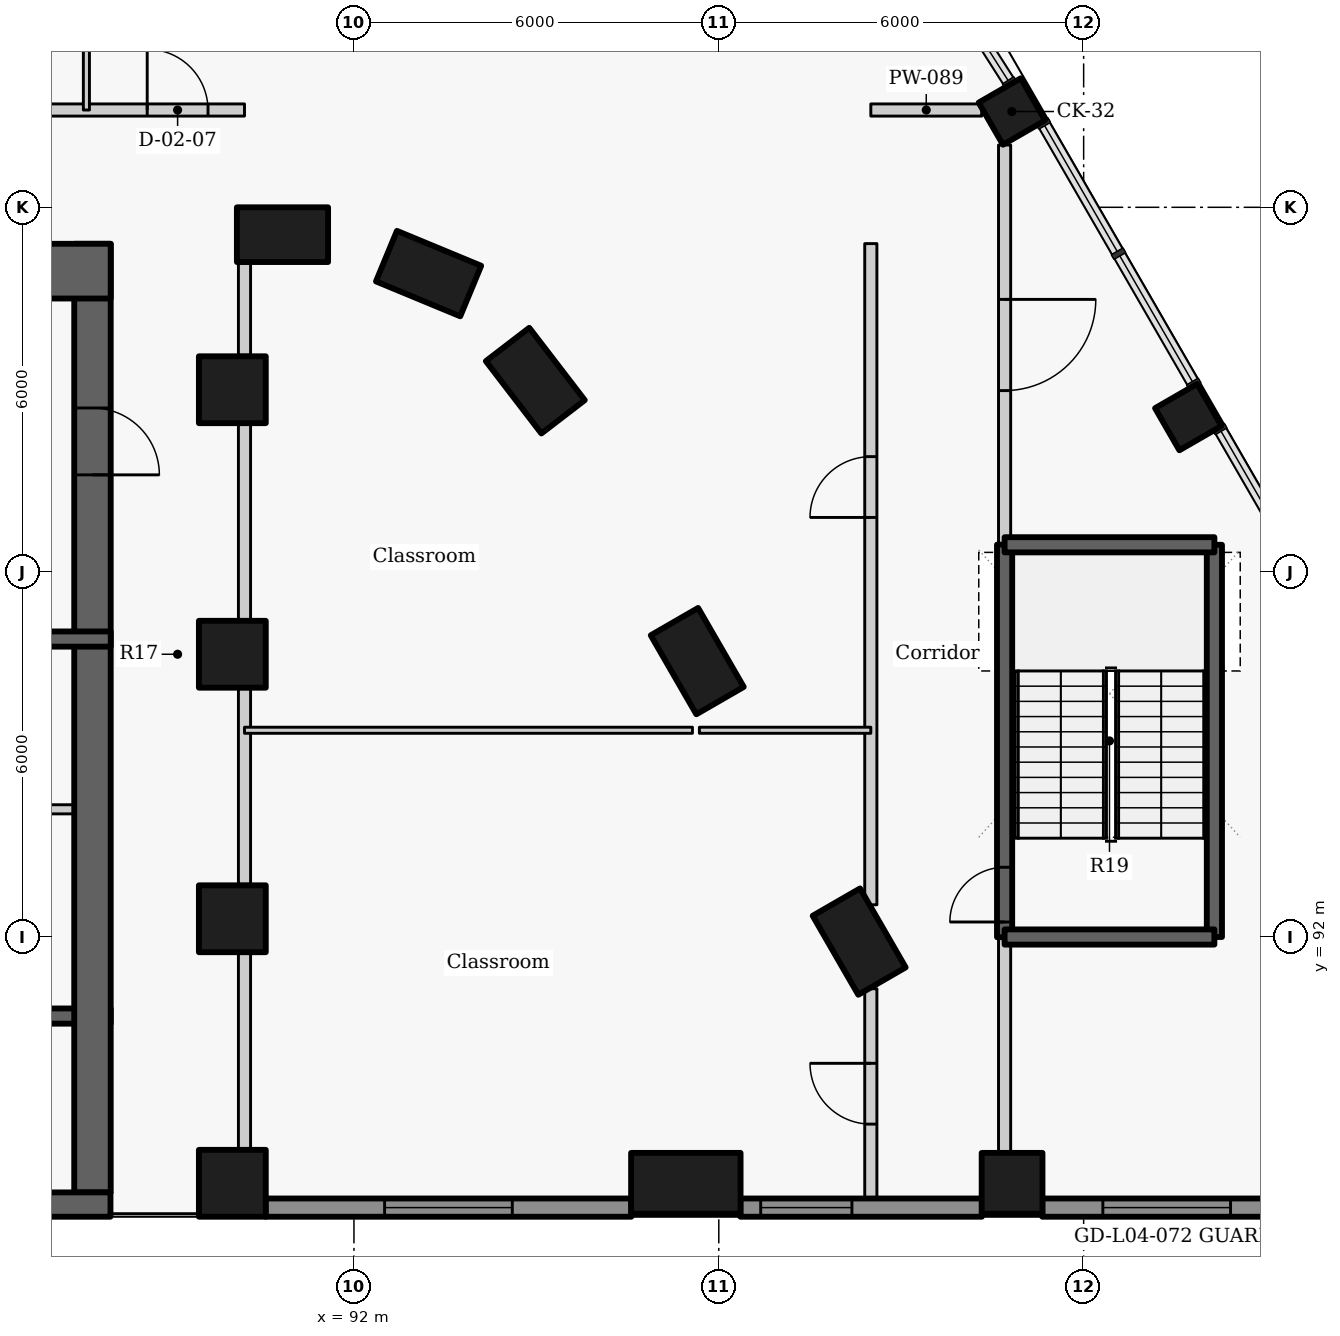
"""IFC4 building model, lengths in metres.
Left out: names, types, materials, properties, quantities, classifications, styles, units other than length and angle.
Written with IfcOpenShell. Run it as: python <this file> out.ifc"""

import sys

from ifc_helpers import new_model, si_unit, direction, frame, frame_2d, origin, origin_2d, place, context, subcontext, project, spatial, rectangle, extrude, element, fill, save


model = new_model("IFC4")
c1 = context("Model", 3, precision=1e-05, world=origin(), true_north=direction((0.0, 1.0)))
c2 = subcontext(c1, "Body", "Model", "MODEL_VIEW")
j1 = project(units=[si_unit("LENGTHUNIT", "METRE"), si_unit("PLANEANGLEUNIT", "RADIAN")], contexts=[c1])
p1 = place(None, origin())
s1 = spatial("IfcSite", under=j1, at=p1, CompositionType="ELEMENT")
p2 = place(p1, origin())
s2 = spatial("IfcBuilding", under=s1, at=p2, CompositionType="ELEMENT")
p3 = place(p2, frame((0.0, 0.0, 19.8)))
s3 = spatial("IfcBuildingStorey", under=s2, at=p3, CompositionType="ELEMENT", Elevation=19.8)
for number, where, z_axis, x_axis in (
    (1, (100.308, 91.925, 0.0), (0.0, 0.0, 1.0), (-0.5, 0.866, 0.0)),
    (2, (97.646, 96.537, 0.0), (0.0, 0.0, 1.0), (-0.5, 0.866, 0.0)),
    (3, (94.982, 101.149, 0.0), (0.0, 0.0, 1.0), (-0.609, 0.793, 0.0)),
    (4, (93.227, 102.91, 0.0), (0.0, 0.0, 1.0), (-0.924, 0.383, 0.0)),
    (5, (90.825, 103.55, 0.0), (0.0, 0.0, 1.0), (-1.0, 0.0, 0.0)),
):
    element("IfcColumn", number, at=place(p3, frame(where, z_axis=z_axis, x_axis=x_axis)), inside=s3, PredefinedType="COLUMN", context=c2, shape_type="SweptSolid", body=[
        extrude(rectangle(XDim=1.5, YDim=0.9, at=origin_2d()), origin(), (0.0, 0.0, 1.0), 4.2),
    ])
for number, where, z_axis, x_axis in (
    (6, (90.0, 87.95, 0.0), (0.0, 0.0, 1.0), (0.0, 1.0, 0.0)),
    (7, (90.0, 92.3, 0.0), (0.0, 0.0, 1.0), (0.0, 1.0, 0.0)),
    (8, (90.0, 96.65, 0.0), (0.0, 0.0, 1.0), (0.0, 1.0, 0.0)),
    (9, (90.0, 101.0, 0.0), (0.0, 0.0, 1.0), (0.0, 1.0, 0.0)),
):
    element("IfcColumn", number, at=place(p3, frame(where, z_axis=z_axis, x_axis=x_axis)), inside=s3, PredefinedType="COLUMN", context=c2, shape_type="SweptSolid", body=[
        extrude(rectangle(XDim=1.1, YDim=1.1, at=origin_2d()), origin(), (0.0, 0.0, 1.0), 4.2),
    ])
for number, where, z_axis, x_axis in (
    (10, (105.721, 100.55, 0.0), (0.0, 0.0, 1.0), (-0.5, 0.866, 0.0)),
    (11, (102.82, 105.575, 0.0), (0.0, 0.0, 1.0), (-0.5, 0.866, 0.0)),
):
    element("IfcColumn", number, at=place(p3, frame(where, z_axis=z_axis, x_axis=x_axis)), inside=s3, PredefinedType="COLUMN", context=c2, shape_type="SweptSolid", body=[
        extrude(rectangle(XDim=0.8, YDim=0.8, at=origin_2d()), origin(), (0.0, 0.0, 1.0), 4.2),
    ])
p4 = place(p3, frame((97.458, 87.95, 0.0), z_axis=(0.0, 0.0, 1.0), x_axis=(1.0, 0.0, 0.0)))
e12 = element("IfcColumn", 12, at=p4, inside=s3, PredefinedType="COLUMN", context=c2, shape_type="SweptSolid", body=[
    extrude(rectangle(XDim=1.8, YDim=1.0, at=origin_2d()), origin(), (0.0, 0.0, 1.0), 4.2),
])
p5 = place(p3, frame((102.823, 87.95, 0.0), z_axis=(0.0, 0.0, 1.0), x_axis=(1.0, 0.0, 0.0)))
e13 = element("IfcColumn", 13, at=p5, inside=s3, PredefinedType="COLUMN", context=c2, shape_type="SweptSolid", body=[
    extrude(rectangle(XDim=1.0, YDim=1.0, at=origin_2d()), origin(), (0.0, 0.0, 1.0), 4.2),
])
p6 = place(p3, frame((90.546, 87.55, 0.0), z_axis=(0.0, 0.0, 1.0), x_axis=(1.0, 0.0, 0.0)))
e14 = element("IfcWall", 14, at=p6, inside=s3, PredefinedType="SOLIDWALL", context=c2, shape_type="SweptSolid", body=[
    extrude(rectangle(XDim=6.016, YDim=0.3, at=frame_2d((3.008, 0.0))), origin(), (0.0, 0.0, 1.0), 3.0),
])
p7 = place(p6, frame((1.958, 0.0, 0.9)))
e15 = element("IfcOpeningElement", 15, at=p7, cuts=e14, PredefinedType="OPENING", context=c2, shape_type="SweptSolid", body=[
    extrude(rectangle(XDim=2.1, YDim=2.05, at=frame_2d((1.05, 1.025))), frame((0.0, 0.16, 0.0), z_axis=(0.0, -1.0, 0.0), x_axis=(1.0, 0.0, 0.0)), (0.0, 0.0, 1.0), 0.32),
])
p8 = place(p3, frame((98.354, 87.55, 0.0), z_axis=(0.0, 0.0, 1.0), x_axis=(1.0, 0.0, 0.0)))
e16 = element("IfcWall", 16, at=p8, inside=s3, PredefinedType="SOLIDWALL", context=c2, shape_type="SweptSolid", body=[
    extrude(rectangle(XDim=3.973, YDim=0.3, at=frame_2d((1.986, 0.0))), origin(), (0.0, 0.0, 1.0), 3.0),
])
p9 = place(p8, frame((0.335, 0.0, 0.9)))
e17 = element("IfcOpeningElement", 17, at=p9, cuts=e16, PredefinedType="OPENING", context=c2, shape_type="SweptSolid", body=[
    extrude(rectangle(XDim=1.5, YDim=2.05, at=frame_2d((0.75, 1.025))), frame((0.0, 0.16, 0.0), z_axis=(0.0, -1.0, 0.0), x_axis=(1.0, 0.0, 0.0)), (0.0, 0.0, 1.0), 0.32),
])
p10 = place(p3, frame((103.319, 87.55, 0.0), z_axis=(0.0, 0.0, 1.0), x_axis=(1.0, 0.0, 0.0)))
e18 = element("IfcWall", 18, at=p10, inside=s3, PredefinedType="SOLIDWALL", context=c2, shape_type="SweptSolid", body=[
    extrude(rectangle(XDim=4.094, YDim=0.3, at=frame_2d((2.047, 0.0))), origin(), (0.0, 0.0, 1.0), 3.0),
])
p11 = place(p10, frame((0.997, 0.0, 0.9)))
e19 = element("IfcOpeningElement", 19, at=p11, cuts=e18, PredefinedType="OPENING", context=c2, shape_type="SweptSolid", body=[
    extrude(rectangle(XDim=2.1, YDim=2.05, at=frame_2d((1.05, 1.025))), frame((0.0, 0.16, 0.0), z_axis=(0.0, -1.0, 0.0), x_axis=(1.0, 0.0, 0.0)), (0.0, 0.0, 1.0), 0.32),
])
p12 = place(p3, frame((88.0, 90.7, -0.3), z_axis=(0.0, 0.0, 1.0), x_axis=(-1.0, 0.0, 0.0)))
e20 = element("IfcWall", 20, at=p12, inside=s3, PredefinedType="SHEAR", context=c2, shape_type="SweptSolid", body=[
    extrude(rectangle(XDim=2.6, YDim=0.25, at=frame_2d((1.3, 0.0))), origin(), (0.0, 0.0, 1.0), 4.2),
])
p13 = place(p12, frame((1.175, 0.0, 0.3)))
e21 = element("IfcOpeningElement", 21, at=p13, cuts=e20, PredefinedType="OPENING", context=c2, shape_type="SweptSolid", body=[
    extrude(rectangle(XDim=0.9, YDim=2.1, at=frame_2d((0.45, 1.05))), frame((0.0, 0.135, 0.0), z_axis=(0.0, -1.0, 0.0), x_axis=(1.0, 0.0, 0.0)), (0.0, 0.0, 1.0), 0.27),
])
p14 = place(p3, frame((87.7, 103.4, -0.3), z_axis=(0.0, 0.0, 1.0), x_axis=(0.0, -1.0, 0.0)))
e22 = element("IfcWall", 22, at=p14, inside=s3, PredefinedType="SHEAR", context=c2, shape_type="SweptSolid", body=[
    extrude(rectangle(XDim=15.6, YDim=0.6, at=frame_2d((7.8, 0.0))), origin(), (0.0, 0.0, 1.0), 4.2),
])
p15 = place(p14, frame((2.7, 0.0, 0.3)))
e23 = element("IfcOpeningElement", 23, at=p15, cuts=e22, PredefinedType="OPENING", context=c2, shape_type="SweptSolid", body=[
    extrude(rectangle(XDim=1.1, YDim=2.1, at=frame_2d((0.55, 1.05))), frame((0.0, 0.31, 0.0), z_axis=(0.0, -1.0, 0.0), x_axis=(1.0, 0.0, 0.0)), (0.0, 0.0, 1.0), 0.62),
])
p16 = place(p3, frame((85.397, 94.1, 0.0), z_axis=(0.0, 0.0, 1.0), x_axis=(1.0, 0.0, 0.0)))
e24 = element("IfcWall", 24, at=p16, inside=s3, PredefinedType="PARTITIONING", context=c2, shape_type="SweptSolid", body=[
    extrude(rectangle(XDim=2.603, YDim=0.15, at=frame_2d((1.302, 0.0))), origin(), (0.0, 0.0, 1.0), 3.9),
])
p17 = place(p16, frame((0.528, 0.0, 0.0)))
e25 = element("IfcOpeningElement", 25, at=p17, cuts=e24, PredefinedType="OPENING", context=c2, shape_type="SweptSolid", body=[
    extrude(rectangle(XDim=0.9, YDim=2.1, at=frame_2d((0.45, 1.05))), frame((0.0, 0.085, 0.0), z_axis=(0.0, -1.0, 0.0), x_axis=(1.0, 0.0, 0.0)), (0.0, 0.0, 1.0), 0.17),
])
p18 = place(p3, frame((80.0, 96.9, -0.3), z_axis=(0.0, 0.0, 1.0), x_axis=(1.0, 0.0, 0.0)))
e26 = element("IfcWall", 26, at=p18, inside=s3, PredefinedType="SHEAR", context=c2, shape_type="SweptSolid", body=[
    extrude(rectangle(XDim=8.0, YDim=0.25, at=frame_2d((4.0, 0.0))), origin(), (0.0, 0.0, 1.0), 4.2),
])
p19 = place(p18, frame((3.849, 0.0, 0.3)))
e27 = element("IfcOpeningElement", 27, at=p19, cuts=e26, PredefinedType="OPENING", context=c2, shape_type="SweptSolid", body=[
    extrude(rectangle(XDim=1.1, YDim=2.1, at=frame_2d((0.55, 1.05))), frame((0.0, 0.135, 0.0), z_axis=(0.0, -1.0, 0.0), x_axis=(1.0, 0.0, 0.0)), (0.0, 0.0, 1.0), 0.27),
])
p20 = place(p3, frame((83.4, 102.95, -0.3), z_axis=(0.0, 0.0, 1.0), x_axis=(1.0, 0.0, 0.0)))
e28 = element("IfcWall", 28, at=p20, inside=s3, PredefinedType="SHEAR", context=c2, shape_type="SweptSolid", body=[
    extrude(rectangle(XDim=4.6, YDim=0.9, at=frame_2d((2.3, 0.0))), origin(), (0.0, 0.0, 1.0), 4.2),
])
p21 = place(p20, frame((1.748, 0.0, 0.3)))
e29 = element("IfcOpeningElement", 29, at=p21, cuts=e28, PredefinedType="OPENING", context=c2, shape_type="SweptSolid", body=[
    extrude(rectangle(XDim=1.1, YDim=2.1, at=frame_2d((0.55, 1.05))), frame((0.0, 0.46, 0.0), z_axis=(0.0, -1.0, 0.0), x_axis=(1.0, 0.0, 0.0)), (0.0, 0.0, 1.0), 0.92),
])
p22 = place(p3, frame((102.7, 91.997, -0.3), z_axis=(0.0, 0.0, 1.0), x_axis=(0.0, 1.0, 0.0)))
e30 = element("IfcWall", 30, at=p22, inside=s3, PredefinedType="SHEAR", context=c2, shape_type="SweptSolid", body=[
    extrude(rectangle(XDim=6.456, YDim=0.25, at=frame_2d((3.228, 0.0))), origin(), (0.0, 0.0, 1.0), 4.2),
])
p23 = place(p22, frame((0.25, 0.0, 0.3)))
e31 = element("IfcOpeningElement", 31, at=p23, cuts=e30, PredefinedType="OPENING", context=c2, shape_type="SweptSolid", body=[
    extrude(rectangle(XDim=0.9, YDim=2.1, at=frame_2d((0.45, 1.05))), frame((0.0, 0.135, 0.0), z_axis=(0.0, -1.0, 0.0), x_axis=(1.0, 0.0, 0.0)), (0.0, 0.0, 1.0), 0.27),
])
p24 = place(p3, frame((102.7, 88.467, 0.0), z_axis=(0.0, 0.0, 1.0), x_axis=(0.0, 1.0, 0.0)))
e32 = element("IfcWall", 32, at=p24, inside=s3, PredefinedType="PARTITIONING", context=c2, shape_type="SweptSolid", body=[
    extrude(rectangle(XDim=3.536, YDim=0.2, at=frame_2d((1.768, 0.0))), origin(), (0.0, 0.0, 1.0), 3.9),
])
p25 = place(p3, frame((102.7, 105.025, 0.0), z_axis=(0.0, 0.0, 1.0), x_axis=(0.0, -1.0, 0.0)))
e33 = element("IfcWall", 33, at=p25, inside=s3, PredefinedType="PARTITIONING", context=c2, shape_type="SweptSolid", body=[
    extrude(rectangle(XDim=6.578, YDim=0.2, at=frame_2d((3.289, 0.0))), origin(), (0.0, 0.0, 1.0), 3.9),
])
p26 = place(p25, frame((2.539, 0.0, 0.0)))
e34 = element("IfcOpeningElement", 34, at=p26, cuts=e33, PredefinedType="OPENING", context=c2, shape_type="SweptSolid", body=[
    extrude(rectangle(XDim=1.5, YDim=2.1, at=frame_2d((0.75, 1.05))), frame((0.0, 0.11, 0.0), z_axis=(0.0, -1.0, 0.0), x_axis=(1.0, 0.0, 0.0)), (0.0, 0.0, 1.0), 0.22),
])
p27 = place(p3, frame((100.5, 87.7, 0.0), z_axis=(0.0, 0.0, 1.0), x_axis=(0.0, 1.0, 0.0)))
e35 = element("IfcWall", 35, at=p27, inside=s3, PredefinedType="PARTITIONING", context=c2, shape_type="SweptSolid", body=[
    extrude(rectangle(XDim=3.449, YDim=0.2, at=frame_2d((1.725, 0.0))), origin(), (0.0, 0.0, 1.0), 3.13),
])
p28 = place(p27, frame((1.223, 0.0, 0.0)))
e36 = element("IfcOpeningElement", 36, at=p28, cuts=e35, PredefinedType="OPENING", context=c2, shape_type="SweptSolid", body=[
    extrude(rectangle(XDim=1.0, YDim=2.1, at=frame_2d((0.5, 1.05))), frame((0.0, 0.11, 0.0), z_axis=(0.0, -1.0, 0.0), x_axis=(1.0, 0.0, 0.0)), (0.0, 0.0, 1.0), 0.22),
])
p29 = place(p3, frame((100.5, 92.53, 0.0), z_axis=(0.0, 0.0, 1.0), x_axis=(0.0, 1.0, 0.0)))
e37 = element("IfcWall", 37, at=p29, inside=s3, PredefinedType="PARTITIONING", context=c2, shape_type="SweptSolid", body=[
    extrude(rectangle(XDim=10.873, YDim=0.2, at=frame_2d((5.437, 0.0))), origin(), (0.0, 0.0, 1.0), 3.9),
])
p30 = place(p29, frame((6.37, 0.0, 0.0)))
e38 = element("IfcOpeningElement", 38, at=p30, cuts=e37, PredefinedType="OPENING", context=c2, shape_type="SweptSolid", body=[
    extrude(rectangle(XDim=1.0, YDim=2.1, at=frame_2d((0.5, 1.05))), frame((0.0, 0.11, 0.0), z_axis=(0.0, -1.0, 0.0), x_axis=(1.0, 0.0, 0.0)), (0.0, 0.0, 1.0), 0.22),
])
p31 = place(p3, frame((69.8, 105.6, 0.0), z_axis=(0.0, 0.0, 1.0), x_axis=(1.0, 0.0, 0.0)))
e39 = element("IfcWall", 39, at=p31, inside=s3, PredefinedType="PARTITIONING", context=c2, shape_type="SweptSolid", body=[
    extrude(rectangle(XDim=20.4, YDim=0.2, at=frame_2d((10.2, 0.0))), origin(), (0.0, 0.0, 1.0), 3.9),
])
p32 = place(p31, frame((0.602, 0.0, 0.0)))
e40 = element("IfcOpeningElement", 40, at=p32, cuts=e39, PredefinedType="OPENING", context=c2, shape_type="SweptSolid", body=[
    extrude(rectangle(XDim=1.0, YDim=2.1, at=frame_2d((0.5, 1.05))), frame((0.0, 0.11, 0.0), z_axis=(0.0, -1.0, 0.0), x_axis=(1.0, 0.0, 0.0)), (0.0, 0.0, 1.0), 0.22),
])
p33 = place(p31, frame((18.8, 0.0, 0.0)))
e41 = element("IfcOpeningElement", 41, at=p33, cuts=e39, PredefinedType="OPENING", context=c2, shape_type="SweptSolid", body=[
    extrude(rectangle(XDim=1.0, YDim=2.1, at=frame_2d((0.5, 1.05))), frame((0.0, 0.11, 0.0), z_axis=(0.0, -1.0, 0.0), x_axis=(1.0, 0.0, 0.0)), (0.0, 0.0, 1.0), 0.22),
])
p34 = place(p31, frame((10.3, 0.0, 0.0)))
e42 = element("IfcOpeningElement", 42, at=p34, cuts=e39, PredefinedType="OPENING", context=c2, shape_type="SweptSolid", body=[
    extrude(rectangle(XDim=1.0, YDim=2.1, at=frame_2d((0.5, 1.05))), frame((0.0, 0.11, 0.0), z_axis=(0.0, -1.0, 0.0), x_axis=(1.0, 0.0, 0.0)), (0.0, 0.0, 1.0), 0.22),
])
p35 = place(p3, frame((100.5, 105.6, 0.0), z_axis=(0.0, 0.0, 1.0), x_axis=(1.0, 0.0, 0.0)))
e43 = element("IfcWall", 43, at=p35, inside=s3, PredefinedType="PARTITIONING", context=c2, shape_type="SweptSolid", body=[
    extrude(rectangle(XDim=1.823, YDim=0.2, at=frame_2d((0.912, 0.0))), origin(), (0.0, 0.0, 1.0), 3.9),
])
p36 = place(p3, frame((90.2, 88.517, 0.0), z_axis=(0.0, 0.0, 1.0), x_axis=(0.0, 1.0, 0.0)))
e44 = element("IfcWall", 44, at=p36, inside=s3, PredefinedType="PARTITIONING", context=c2, shape_type="SweptSolid", body=[
    extrude(rectangle(XDim=3.216, YDim=0.2, at=frame_2d((1.608, 0.0))), origin(), (0.0, 0.0, 1.0), 3.13),
])
for number, where, z_axis, x_axis in (
    (45, (90.2, 92.867, 0.0), (0.0, 0.0, 1.0), (0.0, 1.0, 0.0)),
    (46, (90.2, 97.217, 0.0), (0.0, 0.0, 1.0), (0.0, 1.0, 0.0)),
):
    element("IfcWall", number, at=place(p3, frame(where, z_axis=z_axis, x_axis=x_axis)), inside=s3, PredefinedType="PARTITIONING", context=c2, shape_type="SweptSolid", body=[
        extrude(rectangle(XDim=3.216, YDim=0.2, at=frame_2d((1.608, 0.0))), origin(), (0.0, 0.0, 1.0), 3.13),
    ])
p37 = place(p3, frame((90.2, 101.567, 0.0), z_axis=(0.0, 0.0, 1.0), x_axis=(0.0, 1.0, 0.0)))
e47 = element("IfcWall", 47, at=p37, inside=s3, PredefinedType="PARTITIONING", context=c2, shape_type="SweptSolid", body=[
    extrude(rectangle(XDim=1.516, YDim=0.2, at=frame_2d((0.758, 0.0))), origin(), (0.0, 0.0, 1.0), 3.9),
])
p38 = place(p3, frame((106.15, 92.0, -0.3), z_axis=(0.0, 0.0, 1.0), x_axis=(0.0, 1.0, 0.0)))
e48 = element("IfcWall", 48, at=p38, inside=s3, PredefinedType="SHEAR", context=c2, shape_type="SweptSolid", body=[
    extrude(rectangle(XDim=6.45, YDim=0.25, at=frame_2d((3.225, 0.0))), origin(), (0.0, 0.0, 1.0), 4.2),
])
for number, where, z_axis, x_axis in (
    (49, (102.7, 98.45, -0.3), (0.0, 0.0, 1.0), (1.0, 0.0, 0.0)),
    (50, (102.7, 92.0, -0.3), (0.0, 0.0, 1.0), (1.0, 0.0, 0.0)),
):
    element("IfcWall", number, at=place(p3, frame(where, z_axis=z_axis, x_axis=x_axis)), inside=s3, PredefinedType="SHEAR", context=c2, shape_type="SweptSolid", body=[
        extrude(rectangle(XDim=3.45, YDim=0.25, at=frame_2d((1.725, 0.0))), origin(), (0.0, 0.0, 1.0), 4.2),
    ])
p39 = place(p3, frame((90.2, 95.4, 0.0), z_axis=(0.0, 0.0, 1.0), x_axis=(1.0, 0.0, 0.0)))
e51 = element("IfcWall", 51, at=p39, inside=s3, PredefinedType="PARTITIONING", context=c2, shape_type="SweptSolid", body=[
    extrude(rectangle(XDim=7.366, YDim=0.1, at=frame_2d((3.683, 0.0))), origin(), (0.0, 0.0, 1.0), 3.9),
])
p40 = place(p3, frame((97.68, 95.4, 0.0), z_axis=(0.0, 0.0, 1.0), x_axis=(1.0, 0.0, 0.0)))
e52 = element("IfcWall", 52, at=p40, inside=s3, PredefinedType="PARTITIONING", context=c2, shape_type="SweptSolid", body=[
    extrude(rectangle(XDim=2.82, YDim=0.1, at=frame_2d((1.41, 0.0))), origin(), (0.0, 0.0, 1.0), 2.98),
])
p41 = place(p3, frame((87.6, 105.6, 0.0), z_axis=(0.0, 0.0, 1.0), x_axis=(0.0, 1.0, 0.0)))
e53 = element("IfcWall", 53, at=p41, inside=s3, PredefinedType="PARTITIONING", context=c2, shape_type="SweptSolid", body=[
    extrude(rectangle(XDim=7.1, YDim=0.1, at=frame_2d((3.55, 0.0))), origin(), (0.0, 0.0, 1.0), 3.13),
])
p42 = place(p3, frame((72.004, 87.6, -0.3), z_axis=(0.0, 0.0, 1.0), x_axis=(1.0, 0.0, 0.0)))
e54 = element("IfcWall", 54, at=p42, inside=s3, PredefinedType="SHEAR", context=c2, shape_type="SweptSolid", body=[
    extrude(rectangle(XDim=15.992, YDim=0.4, at=frame_2d((7.996, 0.0))), origin(), (0.0, 0.0, 1.0), 4.2),
])
p43 = place(p7, origin())
e55 = element("IfcWindow", 55, at=p43, inside=s3, PartitioningType="SINGLE_PANEL", PredefinedType="WINDOW", context=c2, shape_type="SweptSolid", body=[
    extrude(rectangle(XDim=2.1, YDim=2.05, at=frame_2d((1.05, 1.025))), frame((0.0, 0.03, 0.0), z_axis=(0.0, -1.0, 0.0), x_axis=(1.0, 0.0, 0.0)), (0.0, 0.0, 1.0), 0.06),
])
fill(e15, e55)
p44 = place(p9, origin())
e56 = element("IfcWindow", 56, at=p44, inside=s3, PartitioningType="SINGLE_PANEL", PredefinedType="WINDOW", context=c2, shape_type="SweptSolid", body=[
    extrude(rectangle(XDim=1.5, YDim=2.05, at=frame_2d((0.75, 1.025))), frame((0.0, 0.03, 0.0), z_axis=(0.0, -1.0, 0.0), x_axis=(1.0, 0.0, 0.0)), (0.0, 0.0, 1.0), 0.06),
])
fill(e17, e56)
p45 = place(p11, origin())
e57 = element("IfcWindow", 57, at=p45, inside=s3, PartitioningType="SINGLE_PANEL", PredefinedType="WINDOW", context=c2, shape_type="SweptSolid", body=[
    extrude(rectangle(XDim=2.1, YDim=2.05, at=frame_2d((1.05, 1.025))), frame((0.0, 0.03, 0.0), z_axis=(0.0, -1.0, 0.0), x_axis=(1.0, 0.0, 0.0)), (0.0, 0.0, 1.0), 0.06),
])
fill(e19, e57)
p46 = place(p23, origin())
e58 = element("IfcDoor", 58, at=p46, inside=s3, OperationType="SINGLE_SWING_LEFT", PredefinedType="DOOR", context=c2, shape_type="SweptSolid", body=[
    extrude(rectangle(XDim=0.9, YDim=2.1, at=frame_2d((0.45, 1.05))), frame((0.0, 0.025, 0.0), z_axis=(0.0, -1.0, 0.0), x_axis=(1.0, 0.0, 0.0)), (0.0, 0.0, 1.0), 0.05),
])
fill(e31, e58)
p47 = place(p26, origin())
e59 = element("IfcDoor", 59, at=p47, inside=s3, OperationType="DOUBLE_DOOR_SINGLE_SWING", PredefinedType="DOOR", context=c2, shape_type="SweptSolid", body=[
    extrude(rectangle(XDim=1.5, YDim=2.1, at=frame_2d((0.75, 1.05))), frame((0.0, 0.025, 0.0), z_axis=(0.0, -1.0, 0.0), x_axis=(1.0, 0.0, 0.0)), (0.0, 0.0, 1.0), 0.05),
])
fill(e34, e59)
p48 = place(p28, origin())
e60 = element("IfcDoor", 60, at=p48, inside=s3, OperationType="SINGLE_SWING_RIGHT", PredefinedType="DOOR", context=c2, shape_type="SweptSolid", body=[
    extrude(rectangle(XDim=1.0, YDim=2.1, at=frame_2d((0.5, 1.05))), frame((0.0, 0.025, 0.0), z_axis=(0.0, -1.0, 0.0), x_axis=(1.0, 0.0, 0.0)), (0.0, 0.0, 1.0), 0.05),
])
fill(e36, e60)
p49 = place(p30, origin())
e61 = element("IfcDoor", 61, at=p49, inside=s3, OperationType="SINGLE_SWING_LEFT", PredefinedType="DOOR", context=c2, shape_type="SweptSolid", body=[
    extrude(rectangle(XDim=1.0, YDim=2.1, at=frame_2d((0.5, 1.05))), frame((0.0, 0.025, 0.0), z_axis=(0.0, -1.0, 0.0), x_axis=(1.0, 0.0, 0.0)), (0.0, 0.0, 1.0), 0.05),
])
fill(e38, e61)
p50 = place(p33, origin())
e62 = element("IfcDoor", 62, at=p50, inside=s3, OperationType="SINGLE_SWING_LEFT", PredefinedType="DOOR", context=c2, shape_type="SweptSolid", body=[
    extrude(rectangle(XDim=1.0, YDim=2.1, at=frame_2d((0.5, 1.05))), frame((0.0, 0.025, 0.0), z_axis=(0.0, -1.0, 0.0), x_axis=(1.0, 0.0, 0.0)), (0.0, 0.0, 1.0), 0.05),
])
fill(e41, e62)
p51 = place(p15, origin())
e63 = element("IfcDoor", 63, at=p51, inside=s3, OperationType="SINGLE_SWING_RIGHT", PredefinedType="DOOR", context=c2, shape_type="SweptSolid", body=[
    extrude(rectangle(XDim=1.1, YDim=2.1, at=frame_2d((0.55, 1.05))), frame((0.0, 0.025, 0.0), z_axis=(0.0, -1.0, 0.0), x_axis=(1.0, 0.0, 0.0)), (0.0, 0.0, 1.0), 0.05),
])
fill(e23, e63)
save(model, sys.argv[1])
